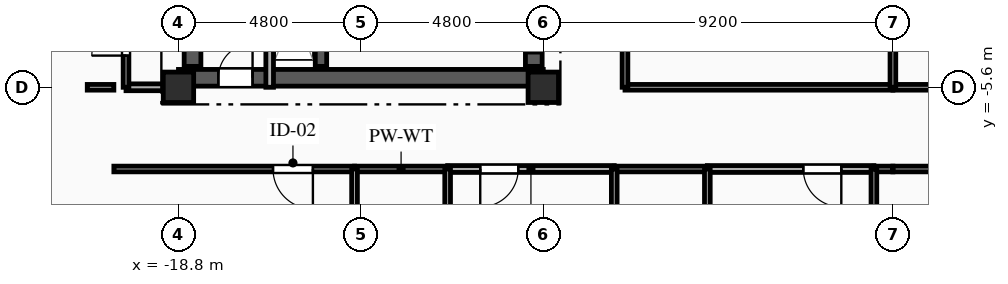
"""IFC4 building model, lengths in metres.
Left out: names, types, materials, properties, quantities, classifications, styles, units other than length and angle.
Written with IfcOpenShell. Run it as: python <this file> out.ifc"""

import sys

from ifc_helpers import new_model, si_unit, direction, frame, frame_2d, origin, origin_2d, place, context, subcontext, project, spatial, rectangle, extrude, element, fill, save


model = new_model("IFC4")
c1 = context("Model", 3, precision=1e-05, world=origin(), true_north=direction((0.0, 1.0)))
c2 = subcontext(c1, "Body", "Model", "MODEL_VIEW")
j1 = project(units=[si_unit("LENGTHUNIT", "METRE"), si_unit("PLANEANGLEUNIT", "RADIAN")], contexts=[c1])
p1 = place(None, origin())
s1 = spatial("IfcSite", under=j1, at=p1, CompositionType="ELEMENT")
p2 = place(p1, origin())
s2 = spatial("IfcBuilding", under=s1, at=p2, CompositionType="ELEMENT")
p3 = place(p2, frame((0.0, 0.0, 248.4)))
s3 = spatial("IfcBuildingStorey", under=s2, at=p3, CompositionType="ELEMENT", Elevation=248.4)
for number, where, z_axis, x_axis in (
    (1, (-18.8, -5.6, 0.0), (0.0, 0.0, 1.0), (1.0, 0.0, 0.0)),
    (2, (-9.2, -5.6, 0.0), (0.0, 0.0, 1.0), (1.0, 0.0, 0.0)),
):
    element("IfcColumn", number, at=place(p3, frame(where, z_axis=z_axis, x_axis=x_axis)), inside=s3, PredefinedType="COLUMN", context=c2, shape_type="SweptSolid", body=[
        extrude(rectangle(XDim=0.8, YDim=0.8, at=origin_2d()), origin(), (0.0, 0.0, 1.0), 3.35),
    ])
p4 = place(p3, frame((-18.8, -5.35, 0.0), z_axis=(0.0, 0.0, 1.0), x_axis=(1.0, 0.0, 0.0)))
e3 = element("IfcWall", 3, at=p4, inside=s3, PredefinedType="SHEAR", context=c2, shape_type="SweptSolid", body=[
    extrude(rectangle(XDim=9.6, YDim=0.44, at=frame_2d((4.8, 0.0))), origin(), (0.0, 0.0, 1.0), 3.04),
])
p5 = place(p4, frame((1.05, 0.0, 0.0)))
e4 = element("IfcOpeningElement", 4, at=p5, cuts=e3, PredefinedType="OPENING", context=c2, shape_type="SweptSolid", body=[
    extrude(rectangle(XDim=0.9, YDim=2.1, at=frame_2d((0.45, 1.05))), frame((0.0, 0.23, 0.0), z_axis=(0.0, -1.0, 0.0), x_axis=(1.0, 0.0, 0.0)), (0.0, 0.0, 1.0), 0.46),
])
p6 = place(p3, frame((-18.43, -5.05, 0.0), z_axis=(0.0, 0.0, 1.0), x_axis=(0.0, 1.0, 0.0)))
e5 = element("IfcWall", 5, at=p6, inside=s3, PredefinedType="SHEAR", context=c2, shape_type="SweptSolid", body=[
    extrude(rectangle(XDim=10.1, YDim=0.44, at=frame_2d((5.05, 0.0))), origin(), (0.0, 0.0, 1.0), 3.04),
])
p7 = place(p3, frame((-9.45, -5.05, 0.0), z_axis=(0.0, 0.0, 1.0), x_axis=(0.0, 1.0, 0.0)))
e6 = element("IfcWall", 6, at=p7, inside=s3, PredefinedType="SHEAR", context=c2, shape_type="SweptSolid", body=[
    extrude(rectangle(XDim=10.1, YDim=0.44, at=frame_2d((5.05, 0.0))), origin(), (0.0, 0.0, 1.0), 3.04),
])
p8 = place(p7, frame((7.175, 0.0, 0.0)))
e7 = element("IfcOpeningElement", 7, at=p8, cuts=e6, PredefinedType="OPENING", context=c2, shape_type="SweptSolid", body=[
    extrude(rectangle(XDim=0.9, YDim=2.1, at=frame_2d((0.45, 1.05))), frame((0.0, 0.23, 0.0), z_axis=(0.0, -1.0, 0.0), x_axis=(1.0, 0.0, 0.0)), (0.0, 0.0, 1.0), 0.46),
])
p9 = place(p7, frame((2.4, 0.0, 0.0)))
e8 = element("IfcOpeningElement", 8, at=p9, cuts=e6, PredefinedType="OPENING", context=c2, shape_type="SweptSolid", body=[
    extrude(rectangle(XDim=1.2, YDim=2.15, at=frame_2d((0.6, 1.075))), frame((0.0, 0.23, 0.0), z_axis=(0.0, -1.0, 0.0), x_axis=(1.0, 0.0, 0.0)), (0.0, 0.0, 1.0), 0.46),
])
p10 = place(p7, frame((0.35, 0.0, 0.0)))
e9 = element("IfcOpeningElement", 9, at=p10, cuts=e6, PredefinedType="OPENING", context=c2, shape_type="SweptSolid", body=[
    extrude(rectangle(XDim=0.9, YDim=2.1, at=frame_2d((0.45, 1.05))), frame((0.0, 0.23, 0.0), z_axis=(0.0, -1.0, 0.0), x_axis=(1.0, 0.0, 0.0)), (0.0, 0.0, 1.0), 0.46),
])
p11 = place(p7, frame((5.0, 0.0, 0.0)))
e10 = element("IfcOpeningElement", 10, at=p11, cuts=e6, PredefinedType="OPENING", context=c2, shape_type="SweptSolid", body=[
    extrude(rectangle(XDim=0.9, YDim=2.1, at=frame_2d((0.45, 1.05))), frame((0.0, 0.23, 0.0), z_axis=(0.0, -1.0, 0.0), x_axis=(1.0, 0.0, 0.0)), (0.0, 0.0, 1.0), 0.46),
])
p12 = place(p3, frame((-15.05, -5.05, 0.0), z_axis=(0.0, 0.0, 1.0), x_axis=(0.0, 1.0, 0.0)))
e11 = element("IfcWall", 11, at=p12, inside=s3, PredefinedType="SHEAR", context=c2, shape_type="SweptSolid", body=[
    extrude(rectangle(XDim=10.1, YDim=0.3, at=frame_2d((5.05, 0.0))), origin(), (0.0, 0.0, 1.0), 3.04),
])
p13 = place(p3, frame((-16.4, -5.6, 0.0), z_axis=(0.0, 0.0, 1.0), x_axis=(0.0, 1.0, 0.0)))
e12 = element("IfcWall", 12, at=p13, inside=s3, PredefinedType="PARTITIONING", context=c2, shape_type="SweptSolid", body=[
    extrude(rectangle(XDim=3.49, YDim=0.2, at=frame_2d((1.745, 0.0))), origin(), (0.0, 0.0, 1.0), 3.04),
])
p14 = place(p3, frame((-20.18, -5.6, 0.0), z_axis=(0.0, 0.0, 1.0), x_axis=(1.0, 0.0, 0.0)))
e13 = element("IfcWall", 13, at=p14, inside=s3, PredefinedType="PARTITIONING", context=c2, shape_type="SweptSolid", body=[
    extrude(rectangle(XDim=1.38, YDim=0.18, at=frame_2d((0.69, 0.0))), origin(), (0.0, 0.0, 1.0), 3.04),
])
p15 = place(p3, frame((-21.2, -5.6, 0.0), z_axis=(0.0, 0.0, 1.0), x_axis=(1.0, 0.0, 0.0)))
e14 = element("IfcWall", 14, at=p15, inside=s3, PredefinedType="PLUMBINGWALL", context=c2, shape_type="SweptSolid", body=[
    extrude(rectangle(XDim=0.7, YDim=0.15, at=frame_2d((0.35, 0.0))), origin(), (0.0, 0.0, 1.0), 3.04),
])
p16 = place(p3, frame((-14.167, -7.75, 0.0), z_axis=(0.0, 0.0, 1.0), x_axis=(-1.0, 0.0, 0.0)))
e15 = element("IfcWall", 15, at=p16, inside=s3, PredefinedType="PARTITIONING", context=c2, shape_type="SweptSolid", body=[
    extrude(rectangle(XDim=6.333, YDim=0.15, at=frame_2d((3.167, 0.0))), origin(), (0.0, 0.0, 1.0), 3.04),
])
p17 = place(p16, frame((1.095, 0.0, 0.0)))
e16 = element("IfcOpeningElement", 16, at=p17, cuts=e15, PredefinedType="OPENING", context=c2, shape_type="SweptSolid", body=[
    extrude(rectangle(XDim=1.05, YDim=2.15, at=frame_2d((0.525, 1.075))), frame((0.0, 0.085, 0.0), z_axis=(0.0, -1.0, 0.0), x_axis=(1.0, 0.0, 0.0)), (0.0, 0.0, 1.0), 0.17),
])
p18 = place(p3, frame((-7.333, -7.75, 0.0), z_axis=(0.0, 0.0, 1.0), x_axis=(-1.0, 0.0, 0.0)))
e17 = element("IfcWall", 17, at=p18, inside=s3, PredefinedType="PARTITIONING", context=c2, shape_type="SweptSolid", body=[
    extrude(rectangle(XDim=4.384, YDim=0.18, at=frame_2d((2.192, 0.0))), origin(), (0.0, 0.0, 1.0), 3.04),
])
p19 = place(p18, frame((2.526, 0.0, 0.0)))
e18 = element("IfcOpeningElement", 18, at=p19, cuts=e17, PredefinedType="OPENING", context=c2, shape_type="SweptSolid", body=[
    extrude(rectangle(XDim=1.0, YDim=2.15, at=frame_2d((0.5, 1.075))), frame((0.0, 0.1, 0.0), z_axis=(0.0, -1.0, 0.0), x_axis=(1.0, 0.0, 0.0)), (0.0, 0.0, 1.0), 0.2),
])
p20 = place(p3, frame((-11.717, -7.75, 0.0), z_axis=(0.0, 0.0, 1.0), x_axis=(-1.0, 0.0, 0.0)))
e19 = element("IfcWall", 19, at=p20, inside=s3, PredefinedType="PLUMBINGWALL", context=c2, shape_type="SweptSolid", body=[
    extrude(rectangle(XDim=2.45, YDim=0.15, at=frame_2d((1.225, 0.0))), origin(), (0.0, 0.0, 1.0), 3.04),
])
p21 = place(p3, frame((-0.5, -7.75, 0.0), z_axis=(0.0, 0.0, 1.0), x_axis=(-1.0, 0.0, 0.0)))
e20 = element("IfcWall", 20, at=p21, inside=s3, PredefinedType="PARTITIONING", context=c2, shape_type="SweptSolid", body=[
    extrude(rectangle(XDim=4.383, YDim=0.18, at=frame_2d((2.191, 0.0))), origin(), (0.0, 0.0, 1.0), 3.04),
])
p22 = place(p21, frame((0.858, 0.0, 0.0)))
e21 = element("IfcOpeningElement", 21, at=p22, cuts=e20, PredefinedType="OPENING", context=c2, shape_type="SweptSolid", body=[
    extrude(rectangle(XDim=1.0, YDim=2.15, at=frame_2d((0.5, 1.075))), frame((0.0, 0.1, 0.0), z_axis=(0.0, -1.0, 0.0), x_axis=(1.0, 0.0, 0.0)), (0.0, 0.0, 1.0), 0.2),
])
p23 = place(p3, frame((-4.883, -7.75, 0.0), z_axis=(0.0, 0.0, 1.0), x_axis=(-1.0, 0.0, 0.0)))
e22 = element("IfcWall", 22, at=p23, inside=s3, PredefinedType="PLUMBINGWALL", context=c2, shape_type="SweptSolid", body=[
    extrude(rectangle(XDim=2.45, YDim=0.15, at=frame_2d((1.225, 0.0))), origin(), (0.0, 0.0, 1.0), 3.04),
])
p24 = place(p3, frame((0.0, -7.75, 0.0), z_axis=(0.0, 0.0, 1.0), x_axis=(-1.0, 0.0, 0.0)))
e23 = element("IfcWall", 23, at=p24, inside=s3, PredefinedType="PLUMBINGWALL", context=c2, shape_type="SweptSolid", body=[
    extrude(rectangle(XDim=0.5, YDim=0.15, at=frame_2d((0.25, 0.0))), origin(), (0.0, 0.0, 1.0), 3.04),
])
p25 = place(p3, frame((-7.05, -5.6, 0.0), z_axis=(0.0, 0.0, 1.0), x_axis=(1.0, 0.0, 0.0)))
e24 = element("IfcWall", 24, at=p25, inside=s3, PredefinedType="PARTITIONING", context=c2, shape_type="SweptSolid", body=[
    extrude(rectangle(XDim=7.05, YDim=0.15, at=frame_2d((3.525, 0.0))), origin(), (0.0, 0.0, 1.0), 2.525),
])
p26 = place(p3, frame((1.95, -7.75, 0.0), z_axis=(0.0, 0.0, 1.0), x_axis=(-1.0, 0.0, 0.0)))
e25 = element("IfcWall", 25, at=p26, inside=s3, PredefinedType="PLUMBINGWALL", context=c2, shape_type="SweptSolid", body=[
    extrude(rectangle(XDim=1.95, YDim=0.15, at=frame_2d((0.975, 0.0))), origin(), (0.0, 0.0, 1.0), 3.04),
])
p27 = place(p3, frame((0.0, -5.6, 0.0), z_axis=(0.0, 0.0, 1.0), x_axis=(1.0, 0.0, 0.0)))
e26 = element("IfcWall", 26, at=p27, inside=s3, PredefinedType="PARTITIONING", context=c2, shape_type="SweptSolid", body=[
    extrude(rectangle(XDim=7.05, YDim=0.15, at=frame_2d((3.525, 0.0))), origin(), (0.0, 0.0, 1.0), 2.525),
])
p28 = place(p27, frame((1.185, 0.0, 0.0)))
e27 = element("IfcOpeningElement", 27, at=p28, cuts=e26, PredefinedType="OPENING", context=c2, shape_type="SweptSolid", body=[
    extrude(rectangle(XDim=1.05, YDim=2.15, at=frame_2d((0.525, 1.075))), frame((0.0, 0.085, 0.0), z_axis=(0.0, -1.0, 0.0), x_axis=(1.0, 0.0, 0.0)), (0.0, 0.0, 1.0), 0.17),
])
p29 = place(p3, frame((-7.05, 8.5, 0.0), z_axis=(0.0, 0.0, 1.0), x_axis=(0.0, -1.0, 0.0)))
e28 = element("IfcWall", 28, at=p29, inside=s3, PredefinedType="PARTITIONING", context=c2, shape_type="SweptSolid", body=[
    extrude(rectangle(XDim=14.1, YDim=0.15, at=frame_2d((7.05, 0.0))), origin(), (0.0, 0.0, 1.0), 3.04),
])
p30 = place(p29, frame((8.011, 0.0, 0.0)))
e29 = element("IfcOpeningElement", 29, at=p30, cuts=e28, PredefinedType="OPENING", context=c2, shape_type="SweptSolid", body=[
    extrude(rectangle(XDim=1.05, YDim=2.15, at=frame_2d((0.525, 1.075))), frame((0.0, 0.085, 0.0), z_axis=(0.0, -1.0, 0.0), x_axis=(1.0, 0.0, 0.0)), (0.0, 0.0, 1.0), 0.17),
])
p31 = place(p3, frame((-20.18, -5.6, 0.0), z_axis=(0.0, 0.0, 1.0), x_axis=(0.0, 1.0, 0.0)))
e30 = element("IfcWall", 30, at=p31, inside=s3, PredefinedType="PLUMBINGWALL", context=c2, shape_type="SweptSolid", body=[
    extrude(rectangle(XDim=2.35, YDim=0.15, at=frame_2d((1.175, 0.0))), origin(), (0.0, 0.0, 1.0), 3.04),
])
p32 = place(p31, frame((0.834, 0.0, 0.0)))
e31 = element("IfcOpeningElement", 31, at=p32, cuts=e30, PredefinedType="OPENING", context=c2, shape_type="SweptSolid", body=[
    extrude(rectangle(XDim=0.9, YDim=2.1, at=frame_2d((0.45, 1.05))), frame((0.0, 0.085, 0.0), z_axis=(0.0, -1.0, 0.0), x_axis=(1.0, 0.0, 0.0)), (0.0, 0.0, 1.0), 0.17),
])
for number, where, z_axis, x_axis in (
    (32, (-14.167, -7.75, 0.0), (0.0, 0.0, 1.0), (0.0, -1.0, 0.0)),
    (33, (-11.717, -9.9, 0.0), (0.0, 0.0, 1.0), (0.0, 1.0, 0.0)),
    (34, (-7.333, -7.75, 0.0), (0.0, 0.0, 1.0), (0.0, -1.0, 0.0)),
    (35, (-4.883, -9.9, 0.0), (0.0, 0.0, 1.0), (0.0, 1.0, 0.0)),
    (36, (-0.5, -7.75, 0.0), (0.0, 0.0, 1.0), (0.0, -1.0, 0.0)),
):
    element("IfcWall", number, at=place(p3, frame(where, z_axis=z_axis, x_axis=x_axis)), inside=s3, PredefinedType="PLUMBINGWALL", context=c2, shape_type="SweptSolid", body=[
        extrude(rectangle(XDim=2.15, YDim=0.15, at=frame_2d((1.075, 0.0))), origin(), (0.0, 0.0, 1.0), 3.04),
    ])
p33 = place(p3, frame((0.0, 1.45, 0.0), z_axis=(0.0, 0.0, 1.0), x_axis=(0.0, -1.0, 0.0)))
e37 = element("IfcWall", 37, at=p33, inside=s3, PredefinedType="PARTITIONING", context=c2, shape_type="SweptSolid", body=[
    extrude(rectangle(XDim=7.05, YDim=0.15, at=frame_2d((3.525, 0.0))), origin(), (0.0, 0.0, 1.0), 3.04),
])
p34 = place(p5, origin())
e38 = element("IfcDoor", 38, at=p34, inside=s3, OperationType="SINGLE_SWING_RIGHT", PredefinedType="DOOR", context=c2, shape_type="SweptSolid", body=[
    extrude(rectangle(XDim=0.9, YDim=2.1, at=frame_2d((0.45, 1.05))), frame((0.0, 0.025, 0.0), z_axis=(0.0, -1.0, 0.0), x_axis=(1.0, 0.0, 0.0)), (0.0, 0.0, 1.0), 0.05),
])
fill(e4, e38)
p35 = place(p10, origin())
e39 = element("IfcDoor", 39, at=p35, inside=s3, OperationType="SINGLE_SWING_RIGHT", PredefinedType="DOOR", context=c2, shape_type="SweptSolid", body=[
    extrude(rectangle(XDim=0.9, YDim=2.1, at=frame_2d((0.45, 1.05))), frame((0.0, 0.025, 0.0), z_axis=(0.0, -1.0, 0.0), x_axis=(1.0, 0.0, 0.0)), (0.0, 0.0, 1.0), 0.05),
])
fill(e9, e39)
p36 = place(p17, origin())
e40 = element("IfcDoor", 40, at=p36, inside=s3, OperationType="SINGLE_SWING_LEFT", PredefinedType="DOOR", context=c2, shape_type="SweptSolid", body=[
    extrude(rectangle(XDim=1.05, YDim=2.15, at=frame_2d((0.525, 1.075))), frame((0.0, 0.025, 0.0), z_axis=(0.0, -1.0, 0.0), x_axis=(1.0, 0.0, 0.0)), (0.0, 0.0, 1.0), 0.05),
])
fill(e16, e40)
p37 = place(p19, origin())
e41 = element("IfcDoor", 41, at=p37, inside=s3, OperationType="SINGLE_SWING_RIGHT", PredefinedType="DOOR", context=c2, shape_type="SweptSolid", body=[
    extrude(rectangle(XDim=1.0, YDim=2.15, at=frame_2d((0.5, 1.075))), frame((0.0, 0.025, 0.0), z_axis=(0.0, -1.0, 0.0), x_axis=(1.0, 0.0, 0.0)), (0.0, 0.0, 1.0), 0.05),
])
fill(e18, e41)
p38 = place(p22, origin())
e42 = element("IfcDoor", 42, at=p38, inside=s3, OperationType="SINGLE_SWING_LEFT", PredefinedType="DOOR", context=c2, shape_type="SweptSolid", body=[
    extrude(rectangle(XDim=1.0, YDim=2.15, at=frame_2d((0.5, 1.075))), frame((0.0, 0.025, 0.0), z_axis=(0.0, -1.0, 0.0), x_axis=(1.0, 0.0, 0.0)), (0.0, 0.0, 1.0), 0.05),
])
fill(e21, e42)
p39 = place(p32, origin())
e43 = element("IfcDoor", 43, at=p39, inside=s3, OperationType="SINGLE_SWING_LEFT", PredefinedType="DOOR", context=c2, shape_type="SweptSolid", body=[
    extrude(rectangle(XDim=0.9, YDim=2.1, at=frame_2d((0.45, 1.05))), frame((0.0, 0.025, 0.0), z_axis=(0.0, -1.0, 0.0), x_axis=(1.0, 0.0, 0.0)), (0.0, 0.0, 1.0), 0.05),
])
fill(e31, e43)
save(model, sys.argv[1])
